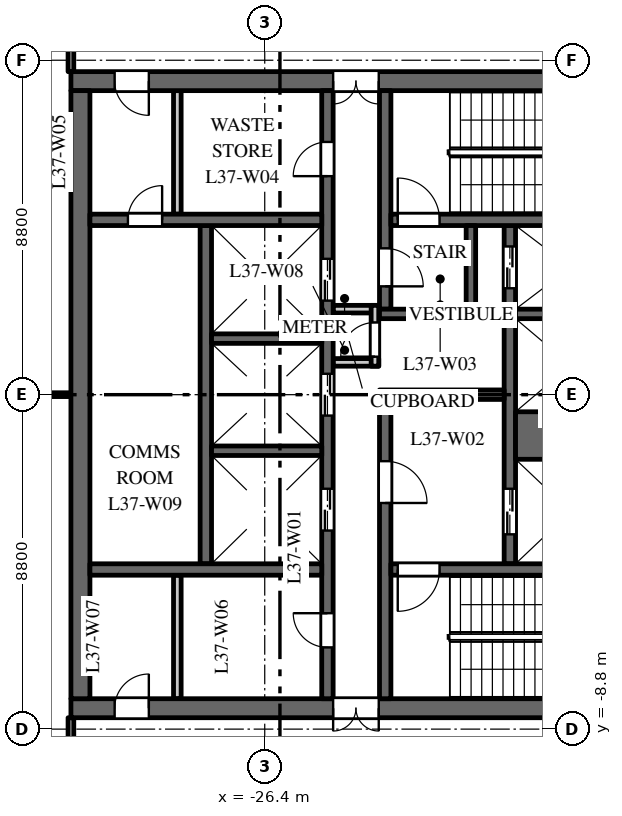
"""IFC4 building model, lengths in metres.
Left out: names, types, materials, properties, quantities, classifications, styles, units other than length and angle.
Written with IfcOpenShell. Run it as: python <this file> out.ifc"""

import sys

from ifc_helpers import new_model, si_unit, direction, frame, frame_2d, origin, place, context, subcontext, project, spatial, rectangle, extrude, element, fill, save


model = new_model("IFC4")
c1 = context("Model", 3, precision=1e-05, world=origin(), true_north=direction((0.0, 1.0)))
c2 = subcontext(c1, "Body", "Model", "MODEL_VIEW")
j1 = project(units=[si_unit("LENGTHUNIT", "METRE"), si_unit("PLANEANGLEUNIT", "RADIAN")], contexts=[c1])
p1 = place(None, origin())
s1 = spatial("IfcSite", under=j1, at=p1, CompositionType="ELEMENT")
p2 = place(p1, origin())
s2 = spatial("IfcBuilding", under=s1, at=p2, CompositionType="ELEMENT")
p3 = place(p2, frame((0.0, 0.0, 162.0)))
s3 = spatial("IfcBuildingStorey", under=s2, at=p3, CompositionType="ELEMENT", Elevation=162.0)
p4 = place(p3, frame((-16.5, 8.25, 0.0), z_axis=(0.0, 0.0, 1.0), x_axis=(-1.0, 0.0, 0.0)))
e1 = element("IfcWall", 1, at=p4, inside=s3, PredefinedType="SHEAR", context=c2, shape_type="SweptSolid", body=[
    extrude(rectangle(XDim=15.0, YDim=0.5, at=frame_2d((7.5, 0.0))), origin(), (0.0, 0.0, 1.0), 3.7),
])
p5 = place(p4, frame((6.9, 0.0, 0.0)))
e2 = element("IfcOpeningElement", 2, at=p5, cuts=e1, PredefinedType="OPENING", context=c2, shape_type="SweptSolid", body=[
    extrude(rectangle(XDim=1.2, YDim=2.1, at=frame_2d((0.6, 1.05))), frame((0.0, 0.26, 0.0), z_axis=(0.0, -1.0, 0.0), x_axis=(1.0, 0.0, 0.0)), (0.0, 0.0, 1.0), 0.52),
])
p6 = place(p4, frame((12.95, 0.0, 0.0)))
e3 = element("IfcOpeningElement", 3, at=p6, cuts=e1, PredefinedType="OPENING", context=c2, shape_type="SweptSolid", body=[
    extrude(rectangle(XDim=0.9, YDim=2.1, at=frame_2d((0.45, 1.05))), frame((0.0, 0.26, 0.0), z_axis=(0.0, -1.0, 0.0), x_axis=(1.0, 0.0, 0.0)), (0.0, 0.0, 1.0), 0.52),
])
p7 = place(p3, frame((-16.5, -8.25, 0.0), z_axis=(0.0, 0.0, 1.0), x_axis=(-1.0, 0.0, 0.0)))
e4 = element("IfcWall", 4, at=p7, inside=s3, PredefinedType="SHEAR", context=c2, shape_type="SweptSolid", body=[
    extrude(rectangle(XDim=15.0, YDim=0.5, at=frame_2d((7.5, 0.0))), origin(), (0.0, 0.0, 1.0), 3.7),
])
p8 = place(p7, frame((6.9, 0.0, 0.0)))
e5 = element("IfcOpeningElement", 5, at=p8, cuts=e4, PredefinedType="OPENING", context=c2, shape_type="SweptSolid", body=[
    extrude(rectangle(XDim=1.2, YDim=2.1, at=frame_2d((0.6, 1.05))), frame((0.0, 0.26, 0.0), z_axis=(0.0, -1.0, 0.0), x_axis=(1.0, 0.0, 0.0)), (0.0, 0.0, 1.0), 0.52),
])
p9 = place(p7, frame((12.95, 0.0, 0.0)))
e6 = element("IfcOpeningElement", 6, at=p9, cuts=e4, PredefinedType="OPENING", context=c2, shape_type="SweptSolid", body=[
    extrude(rectangle(XDim=0.9, YDim=2.1, at=frame_2d((0.45, 1.05))), frame((0.0, 0.26, 0.0), z_axis=(0.0, -1.0, 0.0), x_axis=(1.0, 0.0, 0.0)), (0.0, 0.0, 1.0), 0.52),
])
p10 = place(p3, frame((-27.95, -4.45, 0.0), z_axis=(0.0, 0.0, 1.0), x_axis=(0.0, 1.0, 0.0)))
e7 = element("IfcWall", 7, at=p10, inside=s3, PredefinedType="SHEAR", context=c2, shape_type="SweptSolid", body=[
    extrude(rectangle(XDim=8.9, YDim=0.3, at=frame_2d((4.45, 0.0))), origin(), (0.0, 0.0, 1.0), 3.7),
])
p11 = place(p3, frame((-19.95, -4.45, 0.0), z_axis=(0.0, 0.0, 1.0), x_axis=(0.0, 1.0, 0.0)))
e8 = element("IfcWall", 8, at=p11, inside=s3, PredefinedType="SHEAR", context=c2, shape_type="SweptSolid", body=[
    extrude(rectangle(XDim=8.9, YDim=0.3, at=frame_2d((4.45, 0.0))), origin(), (0.0, 0.0, 1.0), 3.7),
])
p12 = place(p11, frame((0.775, 0.0, 0.0)))
e9 = element("IfcOpeningElement", 9, at=p12, cuts=e8, PredefinedType="OPENING", context=c2, shape_type="SweptSolid", body=[
    extrude(rectangle(XDim=1.2, YDim=2.1, at=frame_2d((0.6, 1.05))), frame((0.0, 0.16, 0.0), z_axis=(0.0, -1.0, 0.0), x_axis=(1.0, 0.0, 0.0)), (0.0, 0.0, 1.0), 0.32),
])
p13 = place(p11, frame((7.25, 0.0, 0.0)))
e10 = element("IfcOpeningElement", 10, at=p13, cuts=e8, PredefinedType="OPENING", context=c2, shape_type="SweptSolid", body=[
    extrude(rectangle(XDim=1.1, YDim=2.1, at=frame_2d((0.55, 1.05))), frame((0.0, 0.16, 0.0), z_axis=(0.0, -1.0, 0.0), x_axis=(1.0, 0.0, 0.0)), (0.0, 0.0, 1.0), 0.32),
])
p14 = place(p3, frame((-24.75, -8.0, 0.0), z_axis=(0.0, 0.0, 1.0), x_axis=(0.0, 1.0, 0.0)))
e11 = element("IfcWall", 11, at=p14, inside=s3, PredefinedType="SHEAR", context=c2, shape_type="SweptSolid", body=[
    extrude(rectangle(XDim=16.0, YDim=0.3, at=frame_2d((8.0, 0.0))), origin(), (0.0, 0.0, 1.0), 3.7),
])
p15 = place(p14, frame((4.425, 0.0, 0.0)))
e12 = element("IfcOpeningElement", 12, at=p15, cuts=e11, PredefinedType="OPENING", context=c2, shape_type="SweptSolid", body=[
    extrude(rectangle(XDim=1.1, YDim=2.1, at=frame_2d((0.55, 1.05))), frame((0.0, 0.16, 0.0), z_axis=(0.0, -1.0, 0.0), x_axis=(1.0, 0.0, 0.0)), (0.0, 0.0, 1.0), 0.32),
])
p16 = place(p14, frame((7.45, 0.0, 0.0)))
e13 = element("IfcOpeningElement", 13, at=p16, cuts=e11, PredefinedType="OPENING", context=c2, shape_type="SweptSolid", body=[
    extrude(rectangle(XDim=1.1, YDim=2.1, at=frame_2d((0.55, 1.05))), frame((0.0, 0.16, 0.0), z_axis=(0.0, -1.0, 0.0), x_axis=(1.0, 0.0, 0.0)), (0.0, 0.0, 1.0), 0.32),
])
p17 = place(p14, frame((10.475, 0.0, 0.0)))
e14 = element("IfcOpeningElement", 14, at=p17, cuts=e11, PredefinedType="OPENING", context=c2, shape_type="SweptSolid", body=[
    extrude(rectangle(XDim=1.1, YDim=2.1, at=frame_2d((0.55, 1.05))), frame((0.0, 0.16, 0.0), z_axis=(0.0, -1.0, 0.0), x_axis=(1.0, 0.0, 0.0)), (0.0, 0.0, 1.0), 0.32),
])
p18 = place(p14, frame((13.75, 0.0, 0.0)))
e15 = element("IfcOpeningElement", 15, at=p18, cuts=e11, PredefinedType="OPENING", context=c2, shape_type="SweptSolid", body=[
    extrude(rectangle(XDim=0.9, YDim=2.1, at=frame_2d((0.45, 1.05))), frame((0.0, 0.16, 0.0), z_axis=(0.0, -1.0, 0.0), x_axis=(1.0, 0.0, 0.0)), (0.0, 0.0, 1.0), 0.32),
])
p19 = place(p14, frame((1.35, 0.0, 0.0)))
e16 = element("IfcOpeningElement", 16, at=p19, cuts=e11, PredefinedType="OPENING", context=c2, shape_type="SweptSolid", body=[
    extrude(rectangle(XDim=0.9, YDim=2.1, at=frame_2d((0.45, 1.05))), frame((0.0, 0.16, 0.0), z_axis=(0.0, -1.0, 0.0), x_axis=(1.0, 0.0, 0.0)), (0.0, 0.0, 1.0), 0.32),
])
p20 = place(p3, frame((-20.1, 0.0, 0.0), z_axis=(0.0, 0.0, 1.0), x_axis=(-1.0, 0.0, 0.0)))
e17 = element("IfcWall", 17, at=p20, inside=s3, PredefinedType="SHEAR", context=c2, shape_type="SweptSolid", body=[
    extrude(rectangle(XDim=3.28, YDim=0.25, at=frame_2d((1.64, 0.0))), origin(), (0.0, 0.0, 1.0), 3.7),
])
for number, where, z_axis, x_axis in (
    (18, (-23.4, 0.85, 0.0), (0.0, 0.0, 1.0), (-1.0, 0.0, 0.0)),
    (19, (-23.4, 2.25, 0.0), (0.0, 0.0, 1.0), (-1.0, 0.0, 0.0)),
):
    element("IfcWall", number, at=place(p3, frame(where, z_axis=z_axis, x_axis=x_axis)), inside=s3, PredefinedType="PARTITIONING", context=c2, shape_type="SweptSolid", body=[
        extrude(rectangle(XDim=1.2, YDim=0.2, at=frame_2d((0.6, 0.0))), origin(), (0.0, 0.0, 1.0), 3.7),
    ])
p21 = place(p3, frame((-23.5, 0.75, 0.0), z_axis=(0.0, 0.0, 1.0), x_axis=(0.0, 1.0, 0.0)))
e20 = element("IfcWall", 20, at=p21, inside=s3, PredefinedType="PARTITIONING", context=c2, shape_type="SweptSolid", body=[
    extrude(rectangle(XDim=1.6, YDim=0.2, at=frame_2d((0.8, 0.0))), origin(), (0.0, 0.0, 1.0), 3.7),
])
p22 = place(p21, frame((0.25, 0.0, 0.0)))
e21 = element("IfcOpeningElement", 21, at=p22, cuts=e20, PredefinedType="OPENING", context=c2, shape_type="SweptSolid", body=[
    extrude(rectangle(XDim=0.9, YDim=2.1, at=frame_2d((0.45, 1.05))), frame((0.0, 0.11, 0.0), z_axis=(0.0, -1.0, 0.0), x_axis=(1.0, 0.0, 0.0)), (0.0, 0.0, 1.0), 0.22),
])
p23 = place(p3, frame((-31.25, -8.0, 0.0), z_axis=(0.0, 0.0, 1.0), x_axis=(0.0, 1.0, 0.0)))
e22 = element("IfcWall", 22, at=p23, inside=s3, PredefinedType="SHEAR", context=c2, shape_type="SweptSolid", body=[
    extrude(rectangle(XDim=16.0, YDim=0.5, at=frame_2d((8.0, 0.0))), origin(), (0.0, 0.0, 1.0), 3.7),
])
p24 = place(p3, frame((-24.9, 4.6, 0.0), z_axis=(0.0, 0.0, 1.0), x_axis=(-1.0, 0.0, 0.0)))
e23 = element("IfcWall", 23, at=p24, inside=s3, PredefinedType="SHEAR", context=c2, shape_type="SweptSolid", body=[
    extrude(rectangle(XDim=6.1, YDim=0.3, at=frame_2d((3.05, 0.0))), origin(), (0.0, 0.0, 1.0), 3.7),
])
p25 = place(p24, frame((4.2, 0.0, 0.0)))
e24 = element("IfcOpeningElement", 24, at=p25, cuts=e23, PredefinedType="OPENING", context=c2, shape_type="SweptSolid", body=[
    extrude(rectangle(XDim=0.9, YDim=2.1, at=frame_2d((0.45, 1.05))), frame((0.0, 0.16, 0.0), z_axis=(0.0, -1.0, 0.0), x_axis=(1.0, 0.0, 0.0)), (0.0, 0.0, 1.0), 0.32),
])
for number, where, z_axis, x_axis in (
    (25, (-28.7, 4.75, 0.0), (0.0, 0.0, 1.0), (0.0, 1.0, 0.0)),
    (26, (-28.7, -8.0, 0.0), (0.0, 0.0, 1.0), (0.0, 1.0, 0.0)),
):
    element("IfcWall", number, at=place(p3, frame(where, z_axis=z_axis, x_axis=x_axis)), inside=s3, PredefinedType="PARTITIONING", context=c2, shape_type="SweptSolid", body=[
        extrude(rectangle(XDim=3.25, YDim=0.2, at=frame_2d((1.625, 0.0))), origin(), (0.0, 0.0, 1.0), 3.7),
    ])
p26 = place(p3, frame((-24.9, -4.6, 0.0), z_axis=(0.0, 0.0, 1.0), x_axis=(-1.0, 0.0, 0.0)))
e27 = element("IfcWall", 27, at=p26, inside=s3, PredefinedType="SHEAR", context=c2, shape_type="SweptSolid", body=[
    extrude(rectangle(XDim=6.1, YDim=0.3, at=frame_2d((3.05, 0.0))), origin(), (0.0, 0.0, 1.0), 3.7),
])
p27 = place(p3, frame((-16.9, -1.075, 0.0), z_axis=(0.0, 0.0, 1.0), x_axis=(-1.0, 0.0, 0.0)))
e28 = element("IfcWall", 28, at=p27, inside=s3, PredefinedType="SHEAR", context=c2, shape_type="SweptSolid", body=[
    extrude(rectangle(XDim=2.9, YDim=1.25, at=frame_2d((1.45, 0.0))), origin(), (0.0, 0.0, 1.0), 3.7),
])
for number, where, z_axis, x_axis in (
    (29, (-16.9, 2.125, 0.0), (0.0, 0.0, 1.0), (-1.0, 0.0, 0.0)),
    (30, (-24.9, -1.475, 0.0), (0.0, 0.0, 1.0), (-1.0, 0.0, 0.0)),
    (31, (-24.9, 1.475, 0.0), (0.0, 0.0, 1.0), (-1.0, 0.0, 0.0)),
):
    element("IfcWall", number, at=place(p3, frame(where, z_axis=z_axis, x_axis=x_axis)), inside=s3, PredefinedType="SHEAR", context=c2, shape_type="SweptSolid", body=[
        extrude(rectangle(XDim=2.9, YDim=0.25, at=frame_2d((1.45, 0.0))), origin(), (0.0, 0.0, 1.0), 3.7),
    ])
p28 = place(p3, frame((-23.23, 2.25, 0.0), z_axis=(0.0, 0.0, 1.0), x_axis=(0.0, 1.0, 0.0)))
e32 = element("IfcWall", 32, at=p28, inside=s3, PredefinedType="SHEAR", context=c2, shape_type="SweptSolid", body=[
    extrude(rectangle(XDim=5.75, YDim=0.3, at=frame_2d((2.875, 0.0))), origin(), (0.0, 0.0, 1.0), 3.7),
])
p29 = place(p28, frame((0.6, 0.0, 0.0)))
e33 = element("IfcOpeningElement", 33, at=p29, cuts=e32, PredefinedType="OPENING", context=c2, shape_type="SweptSolid", body=[
    extrude(rectangle(XDim=1.0, YDim=2.1, at=frame_2d((0.5, 1.05))), frame((0.0, 0.16, 0.0), z_axis=(0.0, -1.0, 0.0), x_axis=(1.0, 0.0, 0.0)), (0.0, 0.0, 1.0), 0.32),
])
p30 = place(p3, frame((-23.23, -8.0, 0.0), z_axis=(0.0, 0.0, 1.0), x_axis=(0.0, 1.0, 0.0)))
e34 = element("IfcWall", 34, at=p30, inside=s3, PredefinedType="SHEAR", context=c2, shape_type="SweptSolid", body=[
    extrude(rectangle(XDim=7.875, YDim=0.3, at=frame_2d((3.938, 0.0))), origin(), (0.0, 0.0, 1.0), 3.7),
])
p31 = place(p30, frame((5.15, 0.0, 0.0)))
e35 = element("IfcOpeningElement", 35, at=p31, cuts=e34, PredefinedType="OPENING", context=c2, shape_type="SweptSolid", body=[
    extrude(rectangle(XDim=1.1, YDim=2.1, at=frame_2d((0.55, 1.05))), frame((0.0, 0.16, 0.0), z_axis=(0.0, -1.0, 0.0), x_axis=(1.0, 0.0, 0.0)), (0.0, 0.0, 1.0), 0.32),
])
p32 = place(p3, frame((-16.9, 4.6, 0.0), z_axis=(0.0, 0.0, 1.0), x_axis=(-1.0, 0.0, 0.0)))
e36 = element("IfcWall", 36, at=p32, inside=s3, PredefinedType="SHEAR", context=c2, shape_type="SweptSolid", body=[
    extrude(rectangle(XDim=6.18, YDim=0.3, at=frame_2d((3.09, 0.0))), origin(), (0.0, 0.0, 1.0), 3.7),
])
p33 = place(p32, frame((4.9, 0.0, 0.0)))
e37 = element("IfcOpeningElement", 37, at=p33, cuts=e36, PredefinedType="OPENING", context=c2, shape_type="SweptSolid", body=[
    extrude(rectangle(XDim=1.1, YDim=2.1, at=frame_2d((0.55, 1.05))), frame((0.0, 0.16, 0.0), z_axis=(0.0, -1.0, 0.0), x_axis=(1.0, 0.0, 0.0)), (0.0, 0.0, 1.0), 0.32),
])
p34 = place(p3, frame((-16.9, -4.6, 0.0), z_axis=(0.0, 0.0, 1.0), x_axis=(-1.0, 0.0, 0.0)))
e38 = element("IfcWall", 38, at=p34, inside=s3, PredefinedType="SHEAR", context=c2, shape_type="SweptSolid", body=[
    extrude(rectangle(XDim=6.18, YDim=0.3, at=frame_2d((3.09, 0.0))), origin(), (0.0, 0.0, 1.0), 3.7),
])
p35 = place(p34, frame((4.9, 0.0, 0.0)))
e39 = element("IfcOpeningElement", 39, at=p35, cuts=e38, PredefinedType="OPENING", context=c2, shape_type="SweptSolid", body=[
    extrude(rectangle(XDim=1.1, YDim=2.1, at=frame_2d((0.55, 1.05))), frame((0.0, 0.16, 0.0), z_axis=(0.0, -1.0, 0.0), x_axis=(1.0, 0.0, 0.0)), (0.0, 0.0, 1.0), 0.32),
])
p36 = place(p3, frame((-20.85, 2.125, 0.0), z_axis=(0.0, 0.0, 1.0), x_axis=(-1.0, 0.0, 0.0)))
e40 = element("IfcWall", 40, at=p36, inside=s3, PredefinedType="SHEAR", context=c2, shape_type="SweptSolid", body=[
    extrude(rectangle(XDim=2.53, YDim=0.25, at=frame_2d((1.265, 0.0))), origin(), (0.0, 0.0, 1.0), 3.7),
])
p37 = place(p3, frame((-20.975, 2.25, 0.0), z_axis=(0.0, 0.0, 1.0), x_axis=(0.0, 1.0, 0.0)))
e41 = element("IfcWall", 41, at=p37, inside=s3, PredefinedType="SHEAR", context=c2, shape_type="SweptSolid", body=[
    extrude(rectangle(XDim=2.2, YDim=0.25, at=frame_2d((1.1, 0.0))), origin(), (0.0, 0.0, 1.0), 3.7),
])
p38 = place(p3, frame((-35.949, 0.0, 0.0), z_axis=(0.0, 0.0, 1.0), x_axis=(1.0, 0.0, 0.0)))
e42 = element("IfcWall", 42, at=p38, inside=s3, PredefinedType="PARTITIONING", context=c2, shape_type="SweptSolid", body=[
    extrude(rectangle(XDim=4.449, YDim=0.1, at=frame_2d((2.225, 0.0))), origin(), (0.0, 0.0, 1.0), 2.9),
])
p39 = place(p3, frame((-31.5, -10.7, 0.0), z_axis=(0.0, 0.0, 1.0), x_axis=(0.0, 1.0, 0.0)))
e43 = element("IfcWall", 43, at=p39, inside=s3, PredefinedType="PARTITIONING", context=c2, shape_type="SweptSolid", body=[
    extrude(rectangle(XDim=2.2, YDim=0.15, at=frame_2d((1.1, 0.0))), origin(), (0.0, 0.0, 1.0), 3.7),
])
p40 = place(p39, frame((0.55, 0.0, 0.0)))
e44 = element("IfcOpeningElement", 44, at=p40, cuts=e43, PredefinedType="OPENING", context=c2, shape_type="SweptSolid", body=[
    extrude(rectangle(XDim=1.0, YDim=2.1, at=frame_2d((0.5, 1.05))), frame((0.0, 0.085, 0.0), z_axis=(0.0, -1.0, 0.0), x_axis=(1.0, 0.0, 0.0)), (0.0, 0.0, 1.0), 0.17),
])
p41 = place(p3, frame((-31.5, 8.5, 0.0), z_axis=(0.0, 0.0, 1.0), x_axis=(0.0, 1.0, 0.0)))
e45 = element("IfcWall", 45, at=p41, inside=s3, PredefinedType="PARTITIONING", context=c2, shape_type="SweptSolid", body=[
    extrude(rectangle(XDim=2.2, YDim=0.15, at=frame_2d((1.1, 0.0))), origin(), (0.0, 0.0, 1.0), 3.7),
])
p42 = place(p41, frame((0.55, 0.0, 0.0)))
e46 = element("IfcOpeningElement", 46, at=p42, cuts=e45, PredefinedType="OPENING", context=c2, shape_type="SweptSolid", body=[
    extrude(rectangle(XDim=1.0, YDim=2.1, at=frame_2d((0.5, 1.05))), frame((0.0, 0.085, 0.0), z_axis=(0.0, -1.0, 0.0), x_axis=(1.0, 0.0, 0.0)), (0.0, 0.0, 1.0), 0.17),
])
p43 = place(p12, origin())
e47 = element("IfcDoor", 47, at=p43, inside=s3, OperationType="DOUBLE_DOOR_SLIDING", PredefinedType="DOOR", context=c2, shape_type="SweptSolid", body=[
    extrude(rectangle(XDim=1.2, YDim=2.1, at=frame_2d((0.6, 1.05))), frame((0.0, 0.025, 0.0), z_axis=(0.0, -1.0, 0.0), x_axis=(1.0, 0.0, 0.0)), (0.0, 0.0, 1.0), 0.05),
])
fill(e9, e47)
p44 = place(p13, origin())
e48 = element("IfcDoor", 48, at=p44, inside=s3, OperationType="DOUBLE_DOOR_SLIDING", PredefinedType="DOOR", context=c2, shape_type="SweptSolid", body=[
    extrude(rectangle(XDim=1.1, YDim=2.1, at=frame_2d((0.55, 1.05))), frame((0.0, 0.025, 0.0), z_axis=(0.0, -1.0, 0.0), x_axis=(1.0, 0.0, 0.0)), (0.0, 0.0, 1.0), 0.05),
])
fill(e10, e48)
p45 = place(p15, origin())
e49 = element("IfcDoor", 49, at=p45, inside=s3, OperationType="DOUBLE_DOOR_SLIDING", PredefinedType="DOOR", context=c2, shape_type="SweptSolid", body=[
    extrude(rectangle(XDim=1.1, YDim=2.1, at=frame_2d((0.55, 1.05))), frame((0.0, 0.025, 0.0), z_axis=(0.0, -1.0, 0.0), x_axis=(1.0, 0.0, 0.0)), (0.0, 0.0, 1.0), 0.05),
])
fill(e12, e49)
p46 = place(p16, origin())
e50 = element("IfcDoor", 50, at=p46, inside=s3, OperationType="DOUBLE_DOOR_SLIDING", PredefinedType="DOOR", context=c2, shape_type="SweptSolid", body=[
    extrude(rectangle(XDim=1.1, YDim=2.1, at=frame_2d((0.55, 1.05))), frame((0.0, 0.025, 0.0), z_axis=(0.0, -1.0, 0.0), x_axis=(1.0, 0.0, 0.0)), (0.0, 0.0, 1.0), 0.05),
])
fill(e13, e50)
p47 = place(p17, origin())
e51 = element("IfcDoor", 51, at=p47, inside=s3, OperationType="DOUBLE_DOOR_SLIDING", PredefinedType="DOOR", context=c2, shape_type="SweptSolid", body=[
    extrude(rectangle(XDim=1.1, YDim=2.1, at=frame_2d((0.55, 1.05))), frame((0.0, 0.025, 0.0), z_axis=(0.0, -1.0, 0.0), x_axis=(1.0, 0.0, 0.0)), (0.0, 0.0, 1.0), 0.05),
])
fill(e14, e51)
p48 = place(p33, origin())
e52 = element("IfcDoor", 52, at=p48, inside=s3, OperationType="SINGLE_SWING_RIGHT", PredefinedType="DOOR", context=c2, shape_type="SweptSolid", body=[
    extrude(rectangle(XDim=1.1, YDim=2.1, at=frame_2d((0.55, 1.05))), frame((0.0, 0.025, 0.0), z_axis=(0.0, -1.0, 0.0), x_axis=(1.0, 0.0, 0.0)), (0.0, 0.0, 1.0), 0.05),
])
fill(e37, e52)
p49 = place(p35, origin())
e53 = element("IfcDoor", 53, at=p49, inside=s3, OperationType="SINGLE_SWING_LEFT", PredefinedType="DOOR", context=c2, shape_type="SweptSolid", body=[
    extrude(rectangle(XDim=1.1, YDim=2.1, at=frame_2d((0.55, 1.05))), frame((0.0, 0.025, 0.0), z_axis=(0.0, -1.0, 0.0), x_axis=(1.0, 0.0, 0.0)), (0.0, 0.0, 1.0), 0.05),
])
fill(e39, e53)
p50 = place(p31, origin())
e54 = element("IfcDoor", 54, at=p50, inside=s3, OperationType="SINGLE_SWING_LEFT", PredefinedType="DOOR", context=c2, shape_type="SweptSolid", body=[
    extrude(rectangle(XDim=1.1, YDim=2.1, at=frame_2d((0.55, 1.05))), frame((0.0, 0.025, 0.0), z_axis=(0.0, -1.0, 0.0), x_axis=(1.0, 0.0, 0.0)), (0.0, 0.0, 1.0), 0.05),
])
fill(e35, e54)
p51 = place(p29, origin())
e55 = element("IfcDoor", 55, at=p51, inside=s3, OperationType="SINGLE_SWING_LEFT", PredefinedType="DOOR", context=c2, shape_type="SweptSolid", body=[
    extrude(rectangle(XDim=1.0, YDim=2.1, at=frame_2d((0.5, 1.05))), frame((0.0, 0.025, 0.0), z_axis=(0.0, -1.0, 0.0), x_axis=(1.0, 0.0, 0.0)), (0.0, 0.0, 1.0), 0.05),
])
fill(e33, e55)
p52 = place(p5, origin())
e56 = element("IfcDoor", 56, at=p52, inside=s3, OperationType="DOUBLE_DOOR_DOUBLE_SWING", PredefinedType="DOOR", context=c2, shape_type="SweptSolid", body=[
    extrude(rectangle(XDim=1.2, YDim=2.1, at=frame_2d((0.6, 1.05))), frame((0.0, 0.025, 0.0), z_axis=(0.0, -1.0, 0.0), x_axis=(1.0, 0.0, 0.0)), (0.0, 0.0, 1.0), 0.05),
])
fill(e2, e56)
p53 = place(p8, origin())
e57 = element("IfcDoor", 57, at=p53, inside=s3, OperationType="DOUBLE_DOOR_DOUBLE_SWING", PredefinedType="DOOR", context=c2, shape_type="SweptSolid", body=[
    extrude(rectangle(XDim=1.2, YDim=2.1, at=frame_2d((0.6, 1.05))), frame((0.0, 0.025, 0.0), z_axis=(0.0, -1.0, 0.0), x_axis=(1.0, 0.0, 0.0)), (0.0, 0.0, 1.0), 0.05),
])
fill(e5, e57)
p54 = place(p18, origin())
e58 = element("IfcDoor", 58, at=p54, inside=s3, OperationType="SINGLE_SWING_RIGHT", PredefinedType="DOOR", context=c2, shape_type="SweptSolid", body=[
    extrude(rectangle(XDim=0.9, YDim=2.1, at=frame_2d((0.45, 1.05))), frame((0.0, 0.025, 0.0), z_axis=(0.0, -1.0, 0.0), x_axis=(1.0, 0.0, 0.0)), (0.0, 0.0, 1.0), 0.05),
])
fill(e15, e58)
p55 = place(p6, origin())
e59 = element("IfcDoor", 59, at=p55, inside=s3, OperationType="SINGLE_SWING_RIGHT", PredefinedType="DOOR", context=c2, shape_type="SweptSolid", body=[
    extrude(rectangle(XDim=0.9, YDim=2.1, at=frame_2d((0.45, 1.05))), frame((0.0, 0.025, 0.0), z_axis=(0.0, -1.0, 0.0), x_axis=(1.0, 0.0, 0.0)), (0.0, 0.0, 1.0), 0.05),
])
fill(e3, e59)
p56 = place(p19, origin())
e60 = element("IfcDoor", 60, at=p56, inside=s3, OperationType="SINGLE_SWING_LEFT", PredefinedType="DOOR", context=c2, shape_type="SweptSolid", body=[
    extrude(rectangle(XDim=0.9, YDim=2.1, at=frame_2d((0.45, 1.05))), frame((0.0, 0.025, 0.0), z_axis=(0.0, -1.0, 0.0), x_axis=(1.0, 0.0, 0.0)), (0.0, 0.0, 1.0), 0.05),
])
fill(e16, e60)
p57 = place(p9, origin())
e61 = element("IfcDoor", 61, at=p57, inside=s3, OperationType="SINGLE_SWING_LEFT", PredefinedType="DOOR", context=c2, shape_type="SweptSolid", body=[
    extrude(rectangle(XDim=0.9, YDim=2.1, at=frame_2d((0.45, 1.05))), frame((0.0, 0.025, 0.0), z_axis=(0.0, -1.0, 0.0), x_axis=(1.0, 0.0, 0.0)), (0.0, 0.0, 1.0), 0.05),
])
fill(e6, e61)
p58 = place(p22, origin())
e62 = element("IfcDoor", 62, at=p58, inside=s3, OperationType="SINGLE_SWING_RIGHT", PredefinedType="DOOR", context=c2, shape_type="SweptSolid", body=[
    extrude(rectangle(XDim=0.9, YDim=2.1, at=frame_2d((0.45, 1.05))), frame((0.0, 0.025, 0.0), z_axis=(0.0, -1.0, 0.0), x_axis=(1.0, 0.0, 0.0)), (0.0, 0.0, 1.0), 0.05),
])
fill(e21, e62)
p59 = place(p25, origin())
e63 = element("IfcDoor", 63, at=p59, inside=s3, OperationType="SINGLE_SWING_LEFT", PredefinedType="DOOR", context=c2, shape_type="SweptSolid", body=[
    extrude(rectangle(XDim=0.9, YDim=2.1, at=frame_2d((0.45, 1.05))), frame((0.0, 0.025, 0.0), z_axis=(0.0, -1.0, 0.0), x_axis=(1.0, 0.0, 0.0)), (0.0, 0.0, 1.0), 0.05),
])
fill(e24, e63)
save(model, sys.argv[1])
